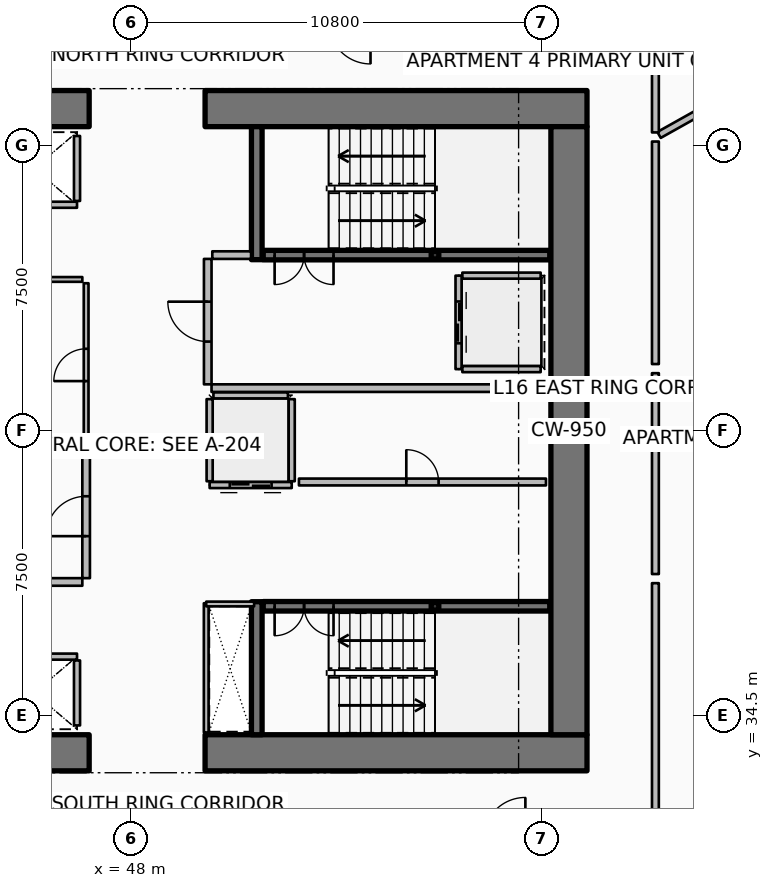
"""IFC4 building model, lengths in metres.
Left out: names, types, materials, properties, quantities, classifications, styles, units other than length and angle.
Written with IfcOpenShell. Run it as: python <this file> out.ifc"""

import sys

from ifc_helpers import new_model, si_unit, direction, frame, frame_2d, origin, origin_2d, place, context, subcontext, project, spatial, rectangle, hollow_rectangle, extrude, element, fill, save


model = new_model("IFC4")
c1 = context("Model", 3, precision=1e-05, world=origin(), true_north=direction((0.0, 1.0)))
c2 = subcontext(c1, "Body", "Model", "MODEL_VIEW")
j1 = project(units=[si_unit("LENGTHUNIT", "METRE"), si_unit("PLANEANGLEUNIT", "RADIAN")], contexts=[c1])
p1 = place(None, origin())
s1 = spatial("IfcSite", under=j1, at=p1, CompositionType="ELEMENT")
p2 = place(p1, origin())
s2 = spatial("IfcBuilding", under=s1, at=p2, CompositionType="ELEMENT")
p3 = place(p2, frame((0.0, 0.0, 67.65)))
s3 = spatial("IfcBuildingStorey", under=s2, at=p3, CompositionType="ELEMENT", Elevation=67.65)
p4 = place(p3, frame((36.85, 33.525, 0.0), z_axis=(0.0, 0.0, 1.0), x_axis=(1.0, 0.0, 0.0)))
e1 = element("IfcWall", 1, at=p4, inside=s3, PredefinedType="SHEAR", context=c2, shape_type="SweptSolid", body=[
    extrude(rectangle(XDim=10.05, YDim=0.95, at=frame_2d((5.025, 0.0))), origin(), (0.0, 0.0, 1.0), 3.75),
])
p5 = place(p3, frame((49.95, 33.525, 0.0), z_axis=(0.0, 0.0, 1.0), x_axis=(1.0, 0.0, 0.0)))
e2 = element("IfcWall", 2, at=p5, inside=s3, PredefinedType="SHEAR", context=c2, shape_type="SweptSolid", body=[
    extrude(rectangle(XDim=10.05, YDim=0.95, at=frame_2d((5.025, 0.0))), origin(), (0.0, 0.0, 1.0), 3.75),
])
p6 = place(p3, frame((36.85, 50.475, 0.0), z_axis=(0.0, 0.0, 1.0), x_axis=(1.0, 0.0, 0.0)))
e3 = element("IfcWall", 3, at=p6, inside=s3, PredefinedType="SHEAR", context=c2, shape_type="SweptSolid", body=[
    extrude(rectangle(XDim=10.05, YDim=0.95, at=frame_2d((5.025, 0.0))), origin(), (0.0, 0.0, 1.0), 3.75),
])
p7 = place(p3, frame((49.95, 50.475, 0.0), z_axis=(0.0, 0.0, 1.0), x_axis=(1.0, 0.0, 0.0)))
e4 = element("IfcWall", 4, at=p7, inside=s3, PredefinedType="SHEAR", context=c2, shape_type="SweptSolid", body=[
    extrude(rectangle(XDim=10.05, YDim=0.95, at=frame_2d((5.025, 0.0))), origin(), (0.0, 0.0, 1.0), 3.75),
])
p8 = place(p3, frame((59.525, 34.0, 0.0), z_axis=(0.0, 0.0, 1.0), x_axis=(0.0, 1.0, 0.0)))
e5 = element("IfcWall", 5, at=p8, inside=s3, PredefinedType="SHEAR", context=c2, shape_type="SweptSolid", body=[
    extrude(rectangle(XDim=16.0, YDim=0.95, at=frame_2d((8.0, 0.0))), origin(), (0.0, 0.0, 1.0), 3.75),
])
for number, where, z_axis, x_axis in (
    (6, (51.31, 46.5, 0.0), (0.0, 0.0, 1.0), (0.0, 1.0, 0.0)),
    (7, (51.31, 34.0, 0.0), (0.0, 0.0, 1.0), (0.0, 1.0, 0.0)),
):
    element("IfcWall", number, at=place(p3, frame(where, z_axis=z_axis, x_axis=x_axis)), inside=s3, PredefinedType="SHEAR", context=c2, shape_type="SweptSolid", body=[
        extrude(rectangle(XDim=3.5, YDim=0.28, at=frame_2d((1.75, 0.0))), origin(), (0.0, 0.0, 1.0), 3.75),
    ])
for number, where, z_axis, x_axis in (
    (8, (56.0, 46.62, 0.0), (0.0, 0.0, 1.0), (1.0, 0.0, 0.0)),
    (9, (56.0, 37.38, 0.0), (0.0, 0.0, 1.0), (1.0, 0.0, 0.0)),
):
    element("IfcColumn", number, at=place(p3, frame(where, z_axis=z_axis, x_axis=x_axis)), inside=s3, PredefinedType="COLUMN", context=c2, shape_type="SweptSolid", body=[
        extrude(hollow_rectangle(XDim=0.2, YDim=0.2, WallThickness=0.01, InnerFilletRadius=0.01, OuterFilletRadius=0.02, at=origin_2d()), origin(), (0.0, 0.0, 1.0), 1.67),
    ])
p9 = place(p3, frame((51.48, 46.62, 0.0), z_axis=(0.0, 0.0, 1.0), x_axis=(1.0, 0.0, 0.0)))
e10 = element("IfcWall", 10, at=p9, inside=s3, PredefinedType="SOLIDWALL", context=c2, shape_type="SweptSolid", body=[
    extrude(rectangle(XDim=7.54, YDim=0.25, at=frame_2d((3.77, 0.0))), origin(), (0.0, 0.0, 1.0), 3.35),
])
p10 = place(p9, frame((0.3, 0.0, 0.0)))
e11 = element("IfcOpeningElement", 11, at=p10, cuts=e10, PredefinedType="OPENING", context=c2, shape_type="SweptSolid", body=[
    extrude(rectangle(XDim=1.55, YDim=2.15, at=frame_2d((0.775, 1.075))), frame((0.0, 0.135, 0.0), z_axis=(0.0, -1.0, 0.0), x_axis=(1.0, 0.0, 0.0)), (0.0, 0.0, 1.0), 0.27),
])
p11 = place(p3, frame((51.48, 37.38, 0.0), z_axis=(0.0, 0.0, 1.0), x_axis=(1.0, 0.0, 0.0)))
e12 = element("IfcWall", 12, at=p11, inside=s3, PredefinedType="SOLIDWALL", context=c2, shape_type="SweptSolid", body=[
    extrude(rectangle(XDim=7.54, YDim=0.25, at=frame_2d((3.77, 0.0))), origin(), (0.0, 0.0, 1.0), 3.35),
])
p12 = place(p11, frame((0.3, 0.0, 0.0)))
e13 = element("IfcOpeningElement", 13, at=p12, cuts=e12, PredefinedType="OPENING", context=c2, shape_type="SweptSolid", body=[
    extrude(rectangle(XDim=1.55, YDim=2.15, at=frame_2d((0.775, 1.075))), frame((0.0, 0.135, 0.0), z_axis=(0.0, -1.0, 0.0), x_axis=(1.0, 0.0, 0.0)), (0.0, 0.0, 1.0), 0.27),
])
p13 = place(p3, frame((46.58, 47.945, 0.0), z_axis=(0.0, 0.0, 1.0), x_axis=(-1.0, 0.0, 0.0)))
e14 = element("IfcWall", 14, at=p13, inside=s3, PredefinedType="PARTITIONING", context=c2, shape_type="SweptSolid", body=[
    extrude(rectangle(XDim=2.26, YDim=0.16, at=frame_2d((1.13, 0.0))), origin(), (0.0, 0.0, 1.0), 3.35),
])
p14 = place(p3, frame((46.58, 48.045, 0.0), z_axis=(0.0, 0.0, 1.0), x_axis=(0.0, 1.0, 0.0)))
e15 = element("IfcWall", 15, at=p14, inside=s3, PredefinedType="PARTITIONING", context=c2, shape_type="SweptSolid", body=[
    extrude(rectangle(XDim=1.71, YDim=0.16, at=frame_2d((0.855, 0.0))), origin(), (0.0, 0.0, 1.0), 3.35),
])
p15 = place(p3, frame((44.32, 36.055, 0.0), z_axis=(0.0, 0.0, 1.0), x_axis=(1.0, 0.0, 0.0)))
e16 = element("IfcWall", 16, at=p15, inside=s3, PredefinedType="PARTITIONING", context=c2, shape_type="SweptSolid", body=[
    extrude(rectangle(XDim=2.26, YDim=0.16, at=frame_2d((1.13, 0.0))), origin(), (0.0, 0.0, 1.0), 3.35),
])
p16 = place(p3, frame((46.58, 34.245, 0.0), z_axis=(0.0, 0.0, 1.0), x_axis=(0.0, 1.0, 0.0)))
e17 = element("IfcWall", 17, at=p16, inside=s3, PredefinedType="PARTITIONING", context=c2, shape_type="SweptSolid", body=[
    extrude(rectangle(XDim=1.71, YDim=0.16, at=frame_2d((0.855, 0.0))), origin(), (0.0, 0.0, 1.0), 3.35),
])
p17 = place(p3, frame((56.62, 46.08, 0.0), z_axis=(0.0, 0.0, 1.0), x_axis=(0.0, -1.0, 0.0)))
e18 = element("IfcWall", 18, at=p17, inside=s3, PredefinedType="PARTITIONING", context=c2, shape_type="SweptSolid", body=[
    extrude(rectangle(XDim=2.46, YDim=0.16, at=frame_2d((1.23, 0.0))), origin(), (0.0, 0.0, 1.0), 3.35),
])
p18 = place(p17, frame((0.68, 0.0, 0.0)))
e19 = element("IfcOpeningElement", 19, at=p18, cuts=e18, PredefinedType="OPENING", context=c2, shape_type="SweptSolid", body=[
    extrude(rectangle(XDim=1.1, YDim=2.1, at=frame_2d((0.55, 1.05))), frame((0.0, 0.09, 0.0), z_axis=(0.0, -1.0, 0.0), x_axis=(1.0, 0.0, 0.0)), (0.0, 0.0, 1.0), 0.18),
])
for number, where, z_axis, x_axis in (
    (20, (56.72, 46.08, 0.0), (0.0, 0.0, 1.0), (1.0, 0.0, 0.0)),
    (21, (56.72, 43.62, 0.0), (0.0, 0.0, 1.0), (1.0, 0.0, 0.0)),
):
    element("IfcWall", number, at=place(p3, frame(where, z_axis=z_axis, x_axis=x_axis)), inside=s3, PredefinedType="PARTITIONING", context=c2, shape_type="SweptSolid", body=[
        extrude(rectangle(XDim=2.06, YDim=0.16, at=frame_2d((1.03, 0.0))), origin(), (0.0, 0.0, 1.0), 3.35),
    ])
p19 = place(p3, frame((52.23, 40.57, 0.0), z_axis=(0.0, 0.0, 1.0), x_axis=(-1.0, 0.0, 0.0)))
e22 = element("IfcWall", 22, at=p19, inside=s3, PredefinedType="PARTITIONING", context=c2, shape_type="SweptSolid", body=[
    extrude(rectangle(XDim=2.16, YDim=0.16, at=frame_2d((1.08, 0.0))), origin(), (0.0, 0.0, 1.0), 3.35),
])
p20 = place(p19, frame((0.53, 0.0, 0.0)))
e23 = element("IfcOpeningElement", 23, at=p20, cuts=e22, PredefinedType="OPENING", context=c2, shape_type="SweptSolid", body=[
    extrude(rectangle(XDim=1.1, YDim=2.1, at=frame_2d((0.55, 1.05))), frame((0.0, 0.09, 0.0), z_axis=(0.0, -1.0, 0.0), x_axis=(1.0, 0.0, 0.0)), (0.0, 0.0, 1.0), 0.18),
])
for number, where, z_axis, x_axis in (
    (24, (52.23, 40.67, 0.0), (0.0, 0.0, 1.0), (0.0, 1.0, 0.0)),
    (25, (50.07, 40.67, 0.0), (0.0, 0.0, 1.0), (0.0, 1.0, 0.0)),
):
    element("IfcWall", number, at=place(p3, frame(where, z_axis=z_axis, x_axis=x_axis)), inside=s3, PredefinedType="PARTITIONING", context=c2, shape_type="SweptSolid", body=[
        extrude(rectangle(XDim=2.16, YDim=0.16, at=frame_2d((1.08, 0.0))), origin(), (0.0, 0.0, 1.0), 3.35),
    ])
p21 = place(p3, frame((50.17, 42.93, 0.0), z_axis=(0.0, 0.0, 1.0), x_axis=(1.0, 0.0, 0.0)))
e26 = element("IfcWall", 26, at=p21, inside=s3, PredefinedType="PARTITIONING", context=c2, shape_type="SweptSolid", body=[
    extrude(rectangle(XDim=1.96, YDim=0.16, at=frame_2d((0.98, 0.0))), origin(), (0.0, 0.0, 1.0), 3.35),
])
p22 = place(p3, frame((52.42, 40.65, 0.0), z_axis=(0.0, 0.0, 1.0), x_axis=(1.0, 0.0, 0.0)))
e27 = element("IfcWall", 27, at=p22, inside=s3, PredefinedType="PARTITIONING", context=c2, shape_type="SweptSolid", body=[
    extrude(rectangle(XDim=6.5, YDim=0.18, at=frame_2d((3.25, 0.0))), origin(), (0.0, 0.0, 1.0), 3.35),
])
p23 = place(p22, frame((2.825, 0.0, 0.0)))
e28 = element("IfcOpeningElement", 28, at=p23, cuts=e27, PredefinedType="OPENING", context=c2, shape_type="SweptSolid", body=[
    extrude(rectangle(XDim=0.85, YDim=2.06, at=frame_2d((0.425, 1.03))), frame((0.0, 0.1, 0.0), z_axis=(0.0, -1.0, 0.0), x_axis=(1.0, 0.0, 0.0)), (0.0, 0.0, 1.0), 0.2),
])
p24 = place(p3, frame((41.35, 38.02, 0.0), z_axis=(0.0, 0.0, 1.0), x_axis=(1.0, 0.0, 0.0)))
e29 = element("IfcWall", 29, at=p24, inside=s3, PredefinedType="PARTITIONING", context=c2, shape_type="SweptSolid", body=[
    extrude(rectangle(XDim=5.37, YDim=0.2, at=frame_2d((2.685, 0.0))), origin(), (0.0, 0.0, 1.0), 3.35),
])
p25 = place(p3, frame((43.92, 41.48, 0.0), z_axis=(0.0, 0.0, 1.0), x_axis=(1.0, 0.0, 0.0)))
e30 = element("IfcWall", 30, at=p25, inside=s3, PredefinedType="PARTITIONING", context=c2, shape_type="SweptSolid", body=[
    extrude(rectangle(XDim=2.8, YDim=0.2, at=frame_2d((1.4, 0.0))), origin(), (0.0, 0.0, 1.0), 3.35),
])
p26 = place(p3, frame((46.82, 38.12, 0.0), z_axis=(0.0, 0.0, 1.0), x_axis=(0.0, 1.0, 0.0)))
e31 = element("IfcWall", 31, at=p26, inside=s3, PredefinedType="PARTITIONING", context=c2, shape_type="SweptSolid", body=[
    extrude(rectangle(XDim=3.26, YDim=0.2, at=frame_2d((1.63, 0.0))), origin(), (0.0, 0.0, 1.0), 3.35),
])
p27 = place(p26, frame((1.105, 0.0, 0.0)))
e32 = element("IfcOpeningElement", 32, at=p27, cuts=e31, PredefinedType="OPENING", context=c2, shape_type="SweptSolid", body=[
    extrude(rectangle(XDim=1.05, YDim=2.1, at=frame_2d((0.525, 1.05))), frame((0.0, 0.11, 0.0), z_axis=(0.0, -1.0, 0.0), x_axis=(1.0, 0.0, 0.0)), (0.0, 0.0, 1.0), 0.22),
])
p28 = place(p3, frame((50.12, 43.12, 0.0), z_axis=(0.0, 0.0, 1.0), x_axis=(1.0, 0.0, 0.0)))
e33 = element("IfcWall", 33, at=p28, inside=s3, PredefinedType="PARTITIONING", context=c2, shape_type="SweptSolid", body=[
    extrude(rectangle(XDim=8.88, YDim=0.2, at=frame_2d((4.44, 0.0))), origin(), (0.0, 0.0, 1.0), 3.35),
])
p29 = place(p3, frame((50.14, 46.62, 0.0), z_axis=(0.0, 0.0, 1.0), x_axis=(1.0, 0.0, 0.0)))
e34 = element("IfcWall", 34, at=p29, inside=s3, PredefinedType="PARTITIONING", context=c2, shape_type="SweptSolid", body=[
    extrude(rectangle(XDim=1.02, YDim=0.2, at=frame_2d((0.51, 0.0))), origin(), (0.0, 0.0, 1.0), 3.35),
])
p30 = place(p3, frame((50.02, 43.22, 0.0), z_axis=(0.0, 0.0, 1.0), x_axis=(0.0, 1.0, 0.0)))
e35 = element("IfcWall", 35, at=p30, inside=s3, PredefinedType="PARTITIONING", context=c2, shape_type="SweptSolid", body=[
    extrude(rectangle(XDim=3.3, YDim=0.2, at=frame_2d((1.65, 0.0))), origin(), (0.0, 0.0, 1.0), 3.35),
])
p31 = place(p30, frame((1.125, 0.0, 0.0)))
e36 = element("IfcOpeningElement", 36, at=p31, cuts=e35, PredefinedType="OPENING", context=c2, shape_type="SweptSolid", body=[
    extrude(rectangle(XDim=1.05, YDim=2.1, at=frame_2d((0.525, 1.05))), frame((0.0, 0.11, 0.0), z_axis=(0.0, -1.0, 0.0), x_axis=(1.0, 0.0, 0.0)), (0.0, 0.0, 1.0), 0.22),
])
p32 = place(p3, frame((41.36, 45.98, 0.0), z_axis=(0.0, 0.0, 1.0), x_axis=(1.0, 0.0, 0.0)))
e37 = element("IfcWall", 37, at=p32, inside=s3, PredefinedType="PARTITIONING", context=c2, shape_type="SweptSolid", body=[
    extrude(rectangle(XDim=5.36, YDim=0.125, at=frame_2d((2.68, 0.0))), origin(), (0.0, 0.0, 1.0), 2.79),
])
p33 = place(p3, frame((49.98, 34.06, 0.0), z_axis=(0.0, 0.0, 1.0), x_axis=(0.0, 1.0, 0.0)))
e38 = element("IfcWall", 38, at=p33, inside=s3, PredefinedType="PARTITIONING", context=c2, shape_type="SweptSolid", body=[
    extrude(rectangle(XDim=3.4, YDim=0.125, at=frame_2d((1.7, 0.0))), origin(), (0.0, 0.0, 1.0), 2.79),
])
p34 = place(p3, frame((49.98, 37.44, 0.0), z_axis=(0.0, 0.0, 1.0), x_axis=(1.0, 0.0, 0.0)))
e39 = element("IfcWall", 39, at=p34, inside=s3, PredefinedType="PARTITIONING", context=c2, shape_type="SweptSolid", body=[
    extrude(rectangle(XDim=1.26, YDim=0.125, at=frame_2d((0.63, 0.0))), origin(), (0.0, 0.0, 1.0), 2.79),
])
p35 = place(p3, frame((46.82, 41.58, 0.0), z_axis=(0.0, 0.0, 1.0), x_axis=(0.0, 1.0, 0.0)))
e40 = element("IfcWall", 40, at=p35, inside=s3, PredefinedType="PARTITIONING", context=c2, shape_type="SweptSolid", body=[
    extrude(rectangle(XDim=4.3, YDim=0.125, at=frame_2d((2.15, 0.0))), origin(), (0.0, 0.0, 1.0), 2.79),
])
p36 = place(p35, frame((1.725, 0.0, 0.0)))
e41 = element("IfcOpeningElement", 41, at=p36, cuts=e40, PredefinedType="OPENING", context=c2, shape_type="SweptSolid", body=[
    extrude(rectangle(XDim=0.85, YDim=2.06, at=frame_2d((0.425, 1.03))), frame((0.0, 0.073, 0.0), z_axis=(0.0, -1.0, 0.0), x_axis=(1.0, 0.0, 0.0)), (0.0, 0.0, 1.0), 0.145),
])
p37 = place(p3, frame((61.896, 49.782, 0.0), z_axis=(0.0, 0.0, 1.0), x_axis=(0.872493215695, 0.488626225828, 0.0)))
e42 = element("IfcWall", 42, at=p37, inside=s3, PredefinedType="PARTITIONING", context=c2, shape_type="SweptSolid", body=[
    extrude(rectangle(XDim=15.612, YDim=0.18, at=frame_2d((7.806, 0.0))), origin(), (0.0, 0.0, 1.0), 2.717),
])
p38 = place(p3, frame((61.8, 31.37, 0.0), z_axis=(0.0, 0.0, 1.0), x_axis=(0.0, 1.0, 0.0)))
e43 = element("IfcWall", 43, at=p38, inside=s3, PredefinedType="PARTITIONING", context=c2, shape_type="SweptSolid", body=[
    extrude(rectangle(XDim=6.618, YDim=0.18, at=frame_2d((3.309, 0.0))), origin(), (0.0, 0.0, 1.0), 2.717),
])
p39 = place(p3, frame((61.8, 38.228, 0.0), z_axis=(0.0, 0.0, 1.0), x_axis=(0.0, 1.0, 0.0)))
e44 = element("IfcWall", 44, at=p39, inside=s3, PredefinedType="PARTITIONING", context=c2, shape_type="SweptSolid", body=[
    extrude(rectangle(XDim=5.285, YDim=0.18, at=frame_2d((2.643, 0.0))), origin(), (0.0, 0.0, 1.0), 2.717),
])
p40 = place(p3, frame((61.8, 43.753, 0.0), z_axis=(0.0, 0.0, 1.0), x_axis=(0.0, 1.0, 0.0)))
e45 = element("IfcWall", 45, at=p40, inside=s3, PredefinedType="PARTITIONING", context=c2, shape_type="SweptSolid", body=[
    extrude(rectangle(XDim=5.855, YDim=0.18, at=frame_2d((2.927, 0.0))), origin(), (0.0, 0.0, 1.0), 2.717),
])
p41 = place(p3, frame((61.8, 49.848, 0.0), z_axis=(0.0, 0.0, 1.0), x_axis=(0.0, 1.0, 0.0)))
e46 = element("IfcWall", 46, at=p41, inside=s3, PredefinedType="PARTITIONING", context=c2, shape_type="SweptSolid", body=[
    extrude(rectangle(XDim=2.781, YDim=0.18, at=frame_2d((1.391, 0.0))), origin(), (0.0, 0.0, 1.0), 2.717),
])
p42 = place(p10, origin())
e47 = element("IfcDoor", 47, at=p42, inside=s3, OperationType="DOUBLE_DOOR_SINGLE_SWING", PredefinedType="DOOR", context=c2, shape_type="SweptSolid", body=[
    extrude(rectangle(XDim=1.55, YDim=2.15, at=frame_2d((0.775, 1.075))), frame((0.0, 0.025, 0.0), z_axis=(0.0, -1.0, 0.0), x_axis=(1.0, 0.0, 0.0)), (0.0, 0.0, 1.0), 0.05),
])
fill(e11, e47)
p43 = place(p12, origin())
e48 = element("IfcDoor", 48, at=p43, inside=s3, OperationType="DOUBLE_DOOR_SINGLE_SWING", PredefinedType="DOOR", context=c2, shape_type="SweptSolid", body=[
    extrude(rectangle(XDim=1.55, YDim=2.15, at=frame_2d((0.775, 1.075))), frame((0.0, 0.025, 0.0), z_axis=(0.0, -1.0, 0.0), x_axis=(1.0, 0.0, 0.0)), (0.0, 0.0, 1.0), 0.05),
])
fill(e13, e48)
p44 = place(p18, origin())
e49 = element("IfcDoor", 49, at=p44, inside=s3, OperationType="DOUBLE_DOOR_SLIDING", PredefinedType="DOOR", context=c2, shape_type="SweptSolid", body=[
    extrude(rectangle(XDim=1.1, YDim=2.1, at=frame_2d((0.55, 1.05))), frame((0.0, 0.025, 0.0), z_axis=(0.0, -1.0, 0.0), x_axis=(1.0, 0.0, 0.0)), (0.0, 0.0, 1.0), 0.05),
])
fill(e19, e49)
p45 = place(p20, origin())
e50 = element("IfcDoor", 50, at=p45, inside=s3, OperationType="DOUBLE_DOOR_SLIDING", PredefinedType="DOOR", context=c2, shape_type="SweptSolid", body=[
    extrude(rectangle(XDim=1.1, YDim=2.1, at=frame_2d((0.55, 1.05))), frame((0.0, 0.025, 0.0), z_axis=(0.0, -1.0, 0.0), x_axis=(1.0, 0.0, 0.0)), (0.0, 0.0, 1.0), 0.05),
])
fill(e23, e50)
p46 = place(p23, origin())
e51 = element("IfcDoor", 51, at=p46, inside=s3, OperationType="SINGLE_SWING_LEFT", PredefinedType="DOOR", context=c2, shape_type="SweptSolid", body=[
    extrude(rectangle(XDim=0.85, YDim=2.06, at=frame_2d((0.425, 1.03))), frame((0.0, 0.025, 0.0), z_axis=(0.0, -1.0, 0.0), x_axis=(1.0, 0.0, 0.0)), (0.0, 0.0, 1.0), 0.05),
])
fill(e28, e51)
p47 = place(p27, origin())
e52 = element("IfcDoor", 52, at=p47, inside=s3, OperationType="SINGLE_SWING_LEFT", PredefinedType="DOOR", context=c2, shape_type="SweptSolid", body=[
    extrude(rectangle(XDim=1.05, YDim=2.1, at=frame_2d((0.525, 1.05))), frame((0.0, 0.025, 0.0), z_axis=(0.0, -1.0, 0.0), x_axis=(1.0, 0.0, 0.0)), (0.0, 0.0, 1.0), 0.05),
])
fill(e32, e52)
p48 = place(p31, origin())
e53 = element("IfcDoor", 53, at=p48, inside=s3, OperationType="SINGLE_SWING_RIGHT", PredefinedType="DOOR", context=c2, shape_type="SweptSolid", body=[
    extrude(rectangle(XDim=1.05, YDim=2.1, at=frame_2d((0.525, 1.05))), frame((0.0, 0.025, 0.0), z_axis=(0.0, -1.0, 0.0), x_axis=(1.0, 0.0, 0.0)), (0.0, 0.0, 1.0), 0.05),
])
fill(e36, e53)
p49 = place(p36, origin())
e54 = element("IfcDoor", 54, at=p49, inside=s3, OperationType="SINGLE_SWING_LEFT", PredefinedType="DOOR", context=c2, shape_type="SweptSolid", body=[
    extrude(rectangle(XDim=0.85, YDim=2.06, at=frame_2d((0.425, 1.03))), frame((0.0, 0.025, 0.0), z_axis=(0.0, -1.0, 0.0), x_axis=(1.0, 0.0, 0.0)), (0.0, 0.0, 1.0), 0.05),
])
fill(e41, e54)
save(model, sys.argv[1])
